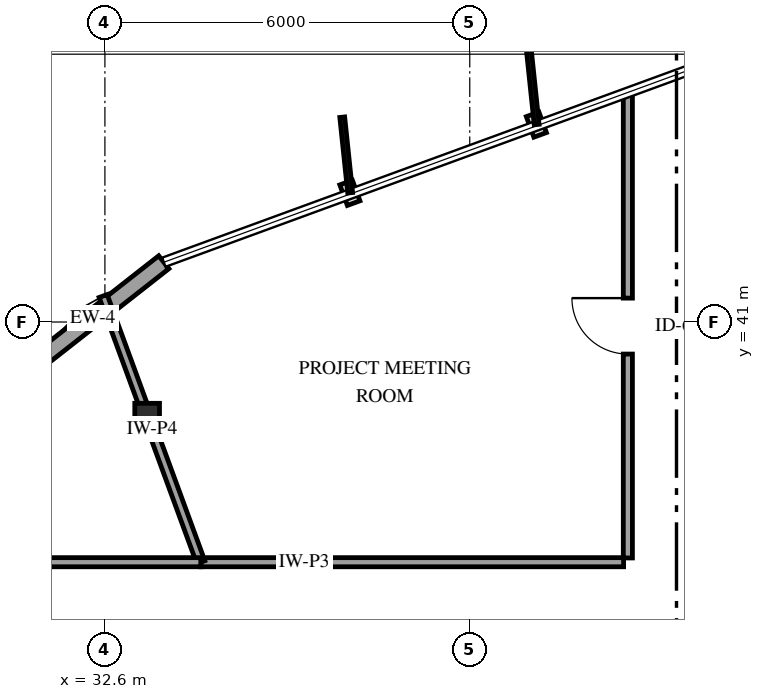
"""IFC4 building model, lengths in metres.
Left out: names, types, materials, properties, quantities, classifications, styles, units other than length and angle.
Written with IfcOpenShell. Run it as: python <this file> out.ifc"""

import sys

from ifc_helpers import new_model, si_unit, direction, frame, frame_2d, origin, origin_2d, place, context, subcontext, project, spatial, rectangle, i_section, extrude, element, fill, save


model = new_model("IFC4")
c1 = context("Model", 3, precision=1e-05, world=origin(), true_north=direction((0.0, 1.0)))
c2 = subcontext(c1, "Body", "Model", "MODEL_VIEW")
j1 = project(units=[si_unit("LENGTHUNIT", "METRE"), si_unit("PLANEANGLEUNIT", "RADIAN")], contexts=[c1])
p1 = place(None, origin())
s1 = spatial("IfcSite", under=j1, at=p1, CompositionType="ELEMENT")
p2 = place(p1, origin())
s2 = spatial("IfcBuilding", under=s1, at=p2, CompositionType="ELEMENT")
p3 = place(p2, frame((0.0, 0.0, 237.4)))
s3 = spatial("IfcBuildingStorey", under=s2, at=p3, CompositionType="ELEMENT", Elevation=237.4)
p4 = place(p3, frame((33.295, 39.455, 0.0), z_axis=(0.0, 0.0, 1.0), x_axis=(1.0, 0.0, 0.0)))
e1 = element("IfcColumn", 1, at=p4, inside=s3, PredefinedType="COLUMN", context=c2, shape_type="SweptSolid", body=[
    extrude(i_section(OverallWidth=0.406, OverallDepth=0.416, WebThickness=0.03, FlangeThickness=0.048, FilletRadius=0.038, at=origin_2d()), origin(), (0.0, 0.0, 1.0), 4.8),
])
p5 = place(p3, frame((33.569, 41.983, 0.0), z_axis=(0.0, 0.0, 1.0), x_axis=(-0.78691766732, -0.617058007694, 0.0)))
e2 = element("IfcWall", 2, at=p5, inside=s3, PredefinedType="SOLIDWALL", context=c2, shape_type="SweptSolid", body=[
    extrude(rectangle(XDim=2.967, YDim=0.27, at=frame_2d((1.483, 0.0))), origin(), (0.0, 0.0, 1.0), 4.179),
])
p6 = place(p3, frame((41.2, 37.12, 0.0), z_axis=(0.0, 0.0, 1.0), x_axis=(0.0, 1.0, 0.0)))
e3 = element("IfcWall", 3, at=p6, inside=s3, PredefinedType="PARTITIONING", context=c2, shape_type="SweptSolid", body=[
    extrude(rectangle(XDim=7.656, YDim=0.15, at=frame_2d((3.828, 0.0))), origin(), (0.0, 0.0, 1.0), 4.8),
])
p7 = place(p6, frame((3.353, 0.0, 0.0)))
e4 = element("IfcOpeningElement", 4, at=p7, cuts=e3, PredefinedType="OPENING", context=c2, shape_type="SweptSolid", body=[
    extrude(rectangle(XDim=0.92, YDim=2.12, at=frame_2d((0.46, 1.06))), frame((0.0, 0.085, 0.0), z_axis=(0.0, -1.0, 0.0), x_axis=(1.0, 0.0, 0.0)), (0.0, 0.0, 1.0), 0.17),
])
p8 = place(p3, frame((34.177, 37.05, 0.0), z_axis=(0.0, 0.0, 1.0), x_axis=(1.0, 0.0, 0.0)))
e5 = element("IfcWall", 5, at=p8, inside=s3, PredefinedType="PARTITIONING", context=c2, shape_type="SweptSolid", body=[
    extrude(rectangle(XDim=6.953, YDim=0.15, at=frame_2d((3.477, 0.0))), origin(), (0.0, 0.0, 1.0), 4.8),
])
p9 = place(p3, frame((34.177, 37.05, 0.0), z_axis=(0.0, 0.0, 1.0), x_axis=(-0.344390019459, 0.938826669038, 0.0)))
e6 = element("IfcWall", 6, at=p9, inside=s3, PredefinedType="PARTITIONING", context=c2, shape_type="SweptSolid", body=[
    extrude(rectangle(XDim=4.663, YDim=0.14, at=frame_2d((2.332, 0.0))), origin(), (0.0, 0.0, 1.0), 3.09),
])
p10 = place(p3, frame((30.62, 37.05, 0.0), z_axis=(0.0, 0.0, 1.0), x_axis=(1.0, 0.0, 0.0)))
e7 = element("IfcWall", 7, at=p10, inside=s3, PredefinedType="PARTITIONING", context=c2, shape_type="SweptSolid", body=[
    extrude(rectangle(XDim=3.557, YDim=0.15, at=frame_2d((1.778, 0.0))), origin(), (0.0, 0.0, 1.0), 4.8),
])
p11 = place(p7, origin())
e8 = element("IfcDoor", 8, at=p11, inside=s3, OperationType="SINGLE_SWING_RIGHT", PredefinedType="DOOR", context=c2, shape_type="SweptSolid", body=[
    extrude(rectangle(XDim=0.92, YDim=2.12, at=frame_2d((0.46, 1.06))), frame((0.0, 0.025, 0.0), z_axis=(0.0, -1.0, 0.0), x_axis=(1.0, 0.0, 0.0)), (0.0, 0.0, 1.0), 0.05),
])
fill(e4, e8)
save(model, sys.argv[1])
